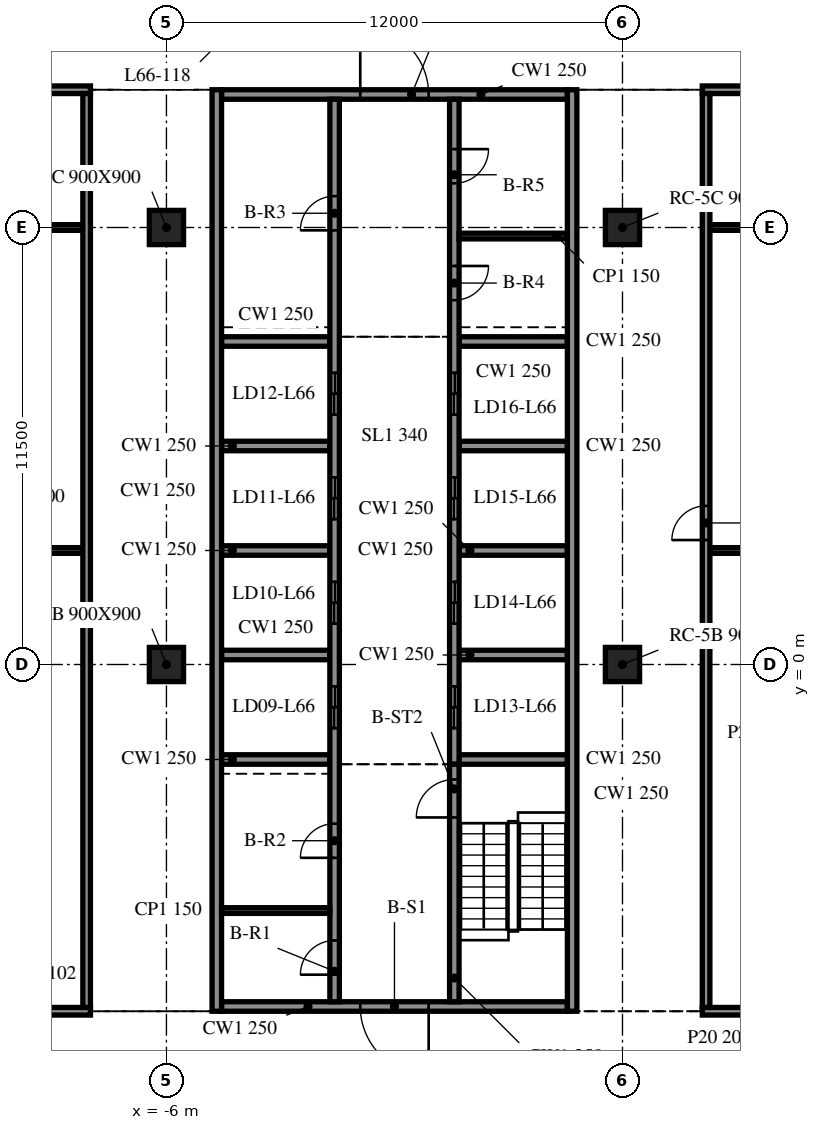
"""IFC4 building model, lengths in metres.
Left out: names, types, materials, properties, quantities, classifications, styles, units other than length and angle.
Written with IfcOpenShell. Run it as: python <this file> out.ifc"""

import sys

from ifc_helpers import new_model, si_unit, direction, frame, frame_2d, origin, origin_2d, place, context, subcontext, project, spatial, rectangle, extrude, element, fill, save


model = new_model("IFC4")
c1 = context("Model", 3, precision=1e-05, world=origin(), true_north=direction((0.0, 1.0)))
c2 = subcontext(c1, "Body", "Model", "MODEL_VIEW")
j1 = project(units=[si_unit("LENGTHUNIT", "METRE"), si_unit("PLANEANGLEUNIT", "RADIAN")], contexts=[c1])
p1 = place(None, origin())
s1 = spatial("IfcSite", under=j1, at=p1, CompositionType="ELEMENT")
p2 = place(p1, origin())
s2 = spatial("IfcBuilding", under=s1, at=p2, CompositionType="ELEMENT")
p3 = place(p2, frame((0.0, 0.0, 270.9)))
s3 = spatial("IfcBuildingStorey", under=s2, at=p3, CompositionType="ELEMENT", Elevation=270.9)
for number, where, z_axis, x_axis in (
    (1, (-6.0, 0.0, -0.34), (0.0, 0.0, 1.0), (1.0, 0.0, 0.0)),
    (2, (-6.0, 11.5, -0.34), (0.0, 0.0, 1.0), (1.0, 0.0, 0.0)),
    (3, (6.0, 0.0, -0.34), (0.0, 0.0, 1.0), (1.0, 0.0, 0.0)),
    (4, (6.0, 11.5, -0.34), (0.0, 0.0, 1.0), (1.0, 0.0, 0.0)),
):
    element("IfcColumn", number, at=place(p3, frame(where, z_axis=z_axis, x_axis=x_axis)), inside=s3, PredefinedType="COLUMN", context=c2, shape_type="SweptSolid", body=[
        extrude(rectangle(XDim=0.9, YDim=0.9, at=origin_2d()), origin(), (0.0, 0.0, 1.0), 3.8),
    ])
for number, where, z_axis, x_axis in (
    (5, (-4.675, 15.125, 0.0), (0.0, 0.0, 1.0), (0.0, -1.0, 0.0)),
    (6, (4.675, -9.125, 0.0), (0.0, 0.0, 1.0), (0.0, 1.0, 0.0)),
):
    element("IfcWall", number, at=place(p3, frame(where, z_axis=z_axis, x_axis=x_axis)), inside=s3, PredefinedType="SOLIDWALL", context=c2, shape_type="SweptSolid", body=[
        extrude(rectangle(XDim=24.25, YDim=0.25, at=frame_2d((12.125, 0.0))), origin(), (0.0, 0.0, 1.0), 3.46),
    ])
p4 = place(p3, frame((4.55, -9.0, 0.0), z_axis=(0.0, 0.0, 1.0), x_axis=(-1.0, 0.0, 0.0)))
e7 = element("IfcWall", 7, at=p4, inside=s3, PredefinedType="SOLIDWALL", context=c2, shape_type="SweptSolid", body=[
    extrude(rectangle(XDim=9.1, YDim=0.25, at=frame_2d((4.55, 0.0))), origin(), (0.0, 0.0, 1.0), 3.46),
])
p5 = place(p4, frame((3.65, 0.0, 0.0)))
e8 = element("IfcOpeningElement", 8, at=p5, cuts=e7, PredefinedType="OPENING", context=c2, shape_type="SweptSolid", body=[
    extrude(rectangle(XDim=1.8, YDim=2.1, at=frame_2d((0.9, 1.05))), frame((0.0, 0.135, 0.0), z_axis=(0.0, -1.0, 0.0), x_axis=(1.0, 0.0, 0.0)), (0.0, 0.0, 1.0), 0.27),
])
p6 = place(p3, frame((-4.55, 15.0, 0.0), z_axis=(0.0, 0.0, 1.0), x_axis=(1.0, 0.0, 0.0)))
e9 = element("IfcWall", 9, at=p6, inside=s3, PredefinedType="SOLIDWALL", context=c2, shape_type="SweptSolid", body=[
    extrude(rectangle(XDim=9.1, YDim=0.25, at=frame_2d((4.55, 0.0))), origin(), (0.0, 0.0, 1.0), 3.46),
])
p7 = place(p6, frame((3.65, 0.0, 0.0)))
e10 = element("IfcOpeningElement", 10, at=p7, cuts=e9, PredefinedType="OPENING", context=c2, shape_type="SweptSolid", body=[
    extrude(rectangle(XDim=1.8, YDim=2.1, at=frame_2d((0.9, 1.05))), frame((0.0, 0.135, 0.0), z_axis=(0.0, -1.0, 0.0), x_axis=(1.0, 0.0, 0.0)), (0.0, 0.0, 1.0), 0.27),
])
p8 = place(p3, frame((-1.575, -8.875, 0.0), z_axis=(0.0, 0.0, 1.0), x_axis=(0.0, 1.0, 0.0)))
e11 = element("IfcWall", 11, at=p8, inside=s3, PredefinedType="SOLIDWALL", context=c2, shape_type="SweptSolid", body=[
    extrude(rectangle(XDim=23.75, YDim=0.25, at=frame_2d((11.875, 0.0))), origin(), (0.0, 0.0, 1.0), 3.46),
])
p9 = place(p8, frame((7.2, 0.0, 0.0)))
e12 = element("IfcOpeningElement", 12, at=p9, cuts=e11, PredefinedType="OPENING", context=c2, shape_type="SweptSolid", body=[
    extrude(rectangle(XDim=1.1, YDim=2.1, at=frame_2d((0.55, 1.05))), frame((0.0, 0.135, 0.0), z_axis=(0.0, -1.0, 0.0), x_axis=(1.0, 0.0, 0.0)), (0.0, 0.0, 1.0), 0.27),
])
p10 = place(p8, frame((9.95, 0.0, 0.0)))
e13 = element("IfcOpeningElement", 13, at=p10, cuts=e11, PredefinedType="OPENING", context=c2, shape_type="SweptSolid", body=[
    extrude(rectangle(XDim=1.1, YDim=2.1, at=frame_2d((0.55, 1.05))), frame((0.0, 0.135, 0.0), z_axis=(0.0, -1.0, 0.0), x_axis=(1.0, 0.0, 0.0)), (0.0, 0.0, 1.0), 0.27),
])
p11 = place(p8, frame((12.7, 0.0, 0.0)))
e14 = element("IfcOpeningElement", 14, at=p11, cuts=e11, PredefinedType="OPENING", context=c2, shape_type="SweptSolid", body=[
    extrude(rectangle(XDim=1.1, YDim=2.1, at=frame_2d((0.55, 1.05))), frame((0.0, 0.135, 0.0), z_axis=(0.0, -1.0, 0.0), x_axis=(1.0, 0.0, 0.0)), (0.0, 0.0, 1.0), 0.27),
])
p12 = place(p8, frame((15.45, 0.0, 0.0)))
e15 = element("IfcOpeningElement", 15, at=p12, cuts=e11, PredefinedType="OPENING", context=c2, shape_type="SweptSolid", body=[
    extrude(rectangle(XDim=1.1, YDim=2.1, at=frame_2d((0.55, 1.05))), frame((0.0, 0.135, 0.0), z_axis=(0.0, -1.0, 0.0), x_axis=(1.0, 0.0, 0.0)), (0.0, 0.0, 1.0), 0.27),
])
p13 = place(p8, frame((0.712, 0.0, 0.0)))
e16 = element("IfcOpeningElement", 16, at=p13, cuts=e11, PredefinedType="OPENING", context=c2, shape_type="SweptSolid", body=[
    extrude(rectangle(XDim=0.9, YDim=2.1, at=frame_2d((0.45, 1.05))), frame((0.0, 0.135, 0.0), z_axis=(0.0, -1.0, 0.0), x_axis=(1.0, 0.0, 0.0)), (0.0, 0.0, 1.0), 0.27),
])
p14 = place(p8, frame((3.788, 0.0, 0.0)))
e17 = element("IfcOpeningElement", 17, at=p14, cuts=e11, PredefinedType="OPENING", context=c2, shape_type="SweptSolid", body=[
    extrude(rectangle(XDim=0.9, YDim=2.1, at=frame_2d((0.45, 1.05))), frame((0.0, 0.135, 0.0), z_axis=(0.0, -1.0, 0.0), x_axis=(1.0, 0.0, 0.0)), (0.0, 0.0, 1.0), 0.27),
])
p15 = place(p8, frame((20.3, 0.0, 0.0)))
e18 = element("IfcOpeningElement", 18, at=p15, cuts=e11, PredefinedType="OPENING", context=c2, shape_type="SweptSolid", body=[
    extrude(rectangle(XDim=0.9, YDim=2.1, at=frame_2d((0.45, 1.05))), frame((0.0, 0.135, 0.0), z_axis=(0.0, -1.0, 0.0), x_axis=(1.0, 0.0, 0.0)), (0.0, 0.0, 1.0), 0.27),
])
p16 = place(p3, frame((1.575, -8.875, 0.0), z_axis=(0.0, 0.0, 1.0), x_axis=(0.0, 1.0, 0.0)))
e19 = element("IfcWall", 19, at=p16, inside=s3, PredefinedType="SOLIDWALL", context=c2, shape_type="SweptSolid", body=[
    extrude(rectangle(XDim=6.25, YDim=0.25, at=frame_2d((3.125, 0.0))), origin(), (0.0, 0.0, 1.0), 3.46),
])
p17 = place(p16, frame((4.85, 0.0, 0.0)))
e20 = element("IfcOpeningElement", 20, at=p17, cuts=e19, PredefinedType="OPENING", context=c2, shape_type="SweptSolid", body=[
    extrude(rectangle(XDim=1.0, YDim=2.1, at=frame_2d((0.5, 1.05))), frame((0.0, 0.135, 0.0), z_axis=(0.0, -1.0, 0.0), x_axis=(1.0, 0.0, 0.0)), (0.0, 0.0, 1.0), 0.27),
])
p18 = place(p3, frame((1.575, 14.875, 0.0), z_axis=(0.0, 0.0, 1.0), x_axis=(0.0, -1.0, 0.0)))
e21 = element("IfcWall", 21, at=p18, inside=s3, PredefinedType="SOLIDWALL", context=c2, shape_type="SweptSolid", body=[
    extrude(rectangle(XDim=17.5, YDim=0.25, at=frame_2d((8.75, 0.0))), origin(), (0.0, 0.0, 1.0), 3.46),
])
p19 = place(p18, frame((15.45, 0.0, 0.0)))
e22 = element("IfcOpeningElement", 22, at=p19, cuts=e21, PredefinedType="OPENING", context=c2, shape_type="SweptSolid", body=[
    extrude(rectangle(XDim=1.1, YDim=2.1, at=frame_2d((0.55, 1.05))), frame((0.0, 0.135, 0.0), z_axis=(0.0, -1.0, 0.0), x_axis=(1.0, 0.0, 0.0)), (0.0, 0.0, 1.0), 0.27),
])
p20 = place(p18, frame((12.7, 0.0, 0.0)))
e23 = element("IfcOpeningElement", 23, at=p20, cuts=e21, PredefinedType="OPENING", context=c2, shape_type="SweptSolid", body=[
    extrude(rectangle(XDim=1.1, YDim=2.1, at=frame_2d((0.55, 1.05))), frame((0.0, 0.135, 0.0), z_axis=(0.0, -1.0, 0.0), x_axis=(1.0, 0.0, 0.0)), (0.0, 0.0, 1.0), 0.27),
])
p21 = place(p18, frame((9.95, 0.0, 0.0)))
e24 = element("IfcOpeningElement", 24, at=p21, cuts=e21, PredefinedType="OPENING", context=c2, shape_type="SweptSolid", body=[
    extrude(rectangle(XDim=1.1, YDim=2.1, at=frame_2d((0.55, 1.05))), frame((0.0, 0.135, 0.0), z_axis=(0.0, -1.0, 0.0), x_axis=(1.0, 0.0, 0.0)), (0.0, 0.0, 1.0), 0.27),
])
p22 = place(p18, frame((7.2, 0.0, 0.0)))
e25 = element("IfcOpeningElement", 25, at=p22, cuts=e21, PredefinedType="OPENING", context=c2, shape_type="SweptSolid", body=[
    extrude(rectangle(XDim=1.1, YDim=2.1, at=frame_2d((0.55, 1.05))), frame((0.0, 0.135, 0.0), z_axis=(0.0, -1.0, 0.0), x_axis=(1.0, 0.0, 0.0)), (0.0, 0.0, 1.0), 0.27),
])
p23 = place(p18, frame((4.387, 0.0, 0.0)))
e26 = element("IfcOpeningElement", 26, at=p23, cuts=e21, PredefinedType="OPENING", context=c2, shape_type="SweptSolid", body=[
    extrude(rectangle(XDim=0.9, YDim=2.1, at=frame_2d((0.45, 1.05))), frame((0.0, 0.135, 0.0), z_axis=(0.0, -1.0, 0.0), x_axis=(1.0, 0.0, 0.0)), (0.0, 0.0, 1.0), 0.27),
])
p24 = place(p18, frame((1.312, 0.0, 0.0)))
e27 = element("IfcOpeningElement", 27, at=p24, cuts=e21, PredefinedType="OPENING", context=c2, shape_type="SweptSolid", body=[
    extrude(rectangle(XDim=0.9, YDim=2.1, at=frame_2d((0.45, 1.05))), frame((0.0, 0.135, 0.0), z_axis=(0.0, -1.0, 0.0), x_axis=(1.0, 0.0, 0.0)), (0.0, 0.0, 1.0), 0.27),
])
for number, where, z_axis, x_axis in (
    (28, (-4.55, -2.5, 0.0), (0.0, 0.0, 1.0), (1.0, 0.0, 0.0)),
    (29, (-4.55, 0.25, 0.0), (0.0, 0.0, 1.0), (1.0, 0.0, 0.0)),
    (30, (-4.55, 3.0, 0.0), (0.0, 0.0, 1.0), (1.0, 0.0, 0.0)),
    (31, (-4.55, 5.75, 0.0), (0.0, 0.0, 1.0), (1.0, 0.0, 0.0)),
    (32, (-4.55, 8.5, 0.0), (0.0, 0.0, 1.0), (1.0, 0.0, 0.0)),
    (33, (1.7, -2.5, 0.0), (0.0, 0.0, 1.0), (1.0, 0.0, 0.0)),
    (34, (1.7, 0.25, 0.0), (0.0, 0.0, 1.0), (1.0, 0.0, 0.0)),
    (35, (1.7, 3.0, 0.0), (0.0, 0.0, 1.0), (1.0, 0.0, 0.0)),
    (36, (1.7, 5.75, 0.0), (0.0, 0.0, 1.0), (1.0, 0.0, 0.0)),
    (37, (1.7, 8.5, 0.0), (0.0, 0.0, 1.0), (1.0, 0.0, 0.0)),
):
    element("IfcWall", number, at=place(p3, frame(where, z_axis=z_axis, x_axis=x_axis)), inside=s3, PredefinedType="SOLIDWALL", context=c2, shape_type="SweptSolid", body=[
        extrude(rectangle(XDim=2.85, YDim=0.25, at=frame_2d((1.425, 0.0))), origin(), (0.0, 0.0, 1.0), 3.46),
    ])
for number, where, z_axis, x_axis in (
    (38, (-4.55, -6.475, 0.0), (0.0, 0.0, 1.0), (1.0, 0.0, 0.0)),
    (39, (1.7, 11.275, 0.0), (0.0, 0.0, 1.0), (1.0, 0.0, 0.0)),
):
    element("IfcWall", number, at=place(p3, frame(where, z_axis=z_axis, x_axis=x_axis)), inside=s3, PredefinedType="PARTITIONING", context=c2, shape_type="SweptSolid", body=[
        extrude(rectangle(XDim=2.85, YDim=0.15, at=frame_2d((1.425, 0.0))), origin(), (0.0, 0.0, 1.0), 3.46),
    ])
p25 = place(p3, frame((-16.1, -9.125, 0.0), z_axis=(0.0, 0.0, 1.0), x_axis=(1.0, 0.0, 0.0)))
e40 = element("IfcWall", 40, at=p25, inside=s3, PredefinedType="PARTITIONING", context=c2, shape_type="SweptSolid", body=[
    extrude(rectangle(XDim=8.1, YDim=0.2, at=frame_2d((4.05, 0.0))), origin(), (0.0, 0.0, 1.0), 3.46),
])
p26 = place(p25, frame((3.5, 0.0, 0.0)))
e41 = element("IfcOpeningElement", 41, at=p26, cuts=e40, PredefinedType="OPENING", context=c2, shape_type="SweptSolid", body=[
    extrude(rectangle(XDim=1.0, YDim=2.1, at=frame_2d((0.5, 1.05))), frame((0.0, 0.11, 0.0), z_axis=(0.0, -1.0, 0.0), x_axis=(1.0, 0.0, 0.0)), (0.0, 0.0, 1.0), 0.22),
])
p27 = place(p3, frame((8.1, -9.125, 0.0), z_axis=(0.0, 0.0, 1.0), x_axis=(1.0, 0.0, 0.0)))
e42 = element("IfcWall", 42, at=p27, inside=s3, PredefinedType="PARTITIONING", context=c2, shape_type="SweptSolid", body=[
    extrude(rectangle(XDim=7.7, YDim=0.2, at=frame_2d((3.85, 0.0))), origin(), (0.0, 0.0, 1.0), 3.46),
])
p28 = place(p27, frame((3.3, 0.0, 0.0)))
e43 = element("IfcOpeningElement", 43, at=p28, cuts=e42, PredefinedType="OPENING", context=c2, shape_type="SweptSolid", body=[
    extrude(rectangle(XDim=1.0, YDim=2.1, at=frame_2d((0.5, 1.05))), frame((0.0, 0.11, 0.0), z_axis=(0.0, -1.0, 0.0), x_axis=(1.0, 0.0, 0.0)), (0.0, 0.0, 1.0), 0.22),
])
p29 = place(p3, frame((-15.9, 3.0, 0.0), z_axis=(0.0, 0.0, 1.0), x_axis=(1.0, 0.0, 0.0)))
e44 = element("IfcWall", 44, at=p29, inside=s3, PredefinedType="PARTITIONING", context=c2, shape_type="SweptSolid", body=[
    extrude(rectangle(XDim=7.7, YDim=0.15, at=frame_2d((3.85, 0.0))), origin(), (0.0, 0.0, 1.0), 3.46),
])
p30 = place(p3, frame((8.3, 3.0, 0.0), z_axis=(0.0, 0.0, 1.0), x_axis=(1.0, 0.0, 0.0)))
e45 = element("IfcWall", 45, at=p30, inside=s3, PredefinedType="PARTITIONING", context=c2, shape_type="SweptSolid", body=[
    extrude(rectangle(XDim=7.3, YDim=0.15, at=frame_2d((3.65, 0.0))), origin(), (0.0, 0.0, 1.0), 3.46),
])
p31 = place(p3, frame((-15.9, 11.5, 0.0), z_axis=(0.0, 0.0, 1.0), x_axis=(1.0, 0.0, 0.0)))
e46 = element("IfcWall", 46, at=p31, inside=s3, PredefinedType="PARTITIONING", context=c2, shape_type="SweptSolid", body=[
    extrude(rectangle(XDim=7.7, YDim=0.15, at=frame_2d((3.85, 0.0))), origin(), (0.0, 0.0, 1.0), 3.46),
])
p32 = place(p3, frame((8.3, 11.5, 0.0), z_axis=(0.0, 0.0, 1.0), x_axis=(1.0, 0.0, 0.0)))
e47 = element("IfcWall", 47, at=p32, inside=s3, PredefinedType="PARTITIONING", context=c2, shape_type="SweptSolid", body=[
    extrude(rectangle(XDim=7.3, YDim=0.15, at=frame_2d((3.65, 0.0))), origin(), (0.0, 0.0, 1.0), 3.46),
])
p33 = place(p3, frame((-16.1, 15.125, 0.0), z_axis=(0.0, 0.0, 1.0), x_axis=(1.0, 0.0, 0.0)))
e48 = element("IfcWall", 48, at=p33, inside=s3, PredefinedType="PARTITIONING", context=c2, shape_type="SweptSolid", body=[
    extrude(rectangle(XDim=8.1, YDim=0.2, at=frame_2d((4.05, 0.0))), origin(), (0.0, 0.0, 1.0), 3.46),
])
p34 = place(p33, frame((3.5, 0.0, 0.0)))
e49 = element("IfcOpeningElement", 49, at=p34, cuts=e48, PredefinedType="OPENING", context=c2, shape_type="SweptSolid", body=[
    extrude(rectangle(XDim=1.0, YDim=2.1, at=frame_2d((0.5, 1.05))), frame((0.0, 0.11, 0.0), z_axis=(0.0, -1.0, 0.0), x_axis=(1.0, 0.0, 0.0)), (0.0, 0.0, 1.0), 0.22),
])
p35 = place(p3, frame((8.1, 15.125, 0.0), z_axis=(0.0, 0.0, 1.0), x_axis=(1.0, 0.0, 0.0)))
e50 = element("IfcWall", 50, at=p35, inside=s3, PredefinedType="PARTITIONING", context=c2, shape_type="SweptSolid", body=[
    extrude(rectangle(XDim=7.7, YDim=0.2, at=frame_2d((3.85, 0.0))), origin(), (0.0, 0.0, 1.0), 3.46),
])
p36 = place(p35, frame((3.3, 0.0, 0.0)))
e51 = element("IfcOpeningElement", 51, at=p36, cuts=e50, PredefinedType="OPENING", context=c2, shape_type="SweptSolid", body=[
    extrude(rectangle(XDim=1.0, YDim=2.1, at=frame_2d((0.5, 1.05))), frame((0.0, 0.11, 0.0), z_axis=(0.0, -1.0, 0.0), x_axis=(1.0, 0.0, 0.0)), (0.0, 0.0, 1.0), 0.22),
])
p37 = place(p3, frame((-8.1, -9.025, 0.0), z_axis=(0.0, 0.0, 1.0), x_axis=(0.0, 1.0, 0.0)))
e52 = element("IfcWall", 52, at=p37, inside=s3, PredefinedType="PARTITIONING", context=c2, shape_type="SweptSolid", body=[
    extrude(rectangle(XDim=24.05, YDim=0.2, at=frame_2d((12.025, 0.0))), origin(), (0.0, 0.0, 1.0), 3.46),
])
p38 = place(p3, frame((8.2, -9.025, 0.0), z_axis=(0.0, 0.0, 1.0), x_axis=(0.0, 1.0, 0.0)))
e53 = element("IfcWall", 53, at=p38, inside=s3, PredefinedType="PARTITIONING", context=c2, shape_type="SweptSolid", body=[
    extrude(rectangle(XDim=24.05, YDim=0.2, at=frame_2d((12.025, 0.0))), origin(), (0.0, 0.0, 1.0), 3.46),
])
p39 = place(p38, frame((12.3, 0.0, 0.0)))
e54 = element("IfcOpeningElement", 54, at=p39, cuts=e53, PredefinedType="OPENING", context=c2, shape_type="SweptSolid", body=[
    extrude(rectangle(XDim=0.9, YDim=2.1, at=frame_2d((0.45, 1.05))), frame((0.0, 0.11, 0.0), z_axis=(0.0, -1.0, 0.0), x_axis=(1.0, 0.0, 0.0)), (0.0, 0.0, 1.0), 0.22),
])
p40 = place(p5, origin())
e55 = element("IfcDoor", 55, at=p40, inside=s3, OperationType="DOUBLE_DOOR_SINGLE_SWING", PredefinedType="DOOR", context=c2, shape_type="SweptSolid", body=[
    extrude(rectangle(XDim=1.8, YDim=2.1, at=frame_2d((0.9, 1.05))), frame((0.0, 0.025, 0.0), z_axis=(0.0, -1.0, 0.0), x_axis=(1.0, 0.0, 0.0)), (0.0, 0.0, 1.0), 0.05),
])
fill(e8, e55)
p41 = place(p7, origin())
e56 = element("IfcDoor", 56, at=p41, inside=s3, OperationType="DOUBLE_DOOR_SINGLE_SWING", PredefinedType="DOOR", context=c2, shape_type="SweptSolid", body=[
    extrude(rectangle(XDim=1.8, YDim=2.1, at=frame_2d((0.9, 1.05))), frame((0.0, 0.025, 0.0), z_axis=(0.0, -1.0, 0.0), x_axis=(1.0, 0.0, 0.0)), (0.0, 0.0, 1.0), 0.05),
])
fill(e10, e56)
p42 = place(p19, origin())
e57 = element("IfcDoor", 57, at=p42, inside=s3, OperationType="DOUBLE_DOOR_SLIDING", PredefinedType="DOOR", context=c2, shape_type="SweptSolid", body=[
    extrude(rectangle(XDim=1.1, YDim=2.1, at=frame_2d((0.55, 1.05))), frame((0.0, 0.025, 0.0), z_axis=(0.0, -1.0, 0.0), x_axis=(1.0, 0.0, 0.0)), (0.0, 0.0, 1.0), 0.05),
])
fill(e22, e57)
p43 = place(p20, origin())
e58 = element("IfcDoor", 58, at=p43, inside=s3, OperationType="DOUBLE_DOOR_SLIDING", PredefinedType="DOOR", context=c2, shape_type="SweptSolid", body=[
    extrude(rectangle(XDim=1.1, YDim=2.1, at=frame_2d((0.55, 1.05))), frame((0.0, 0.025, 0.0), z_axis=(0.0, -1.0, 0.0), x_axis=(1.0, 0.0, 0.0)), (0.0, 0.0, 1.0), 0.05),
])
fill(e23, e58)
p44 = place(p21, origin())
e59 = element("IfcDoor", 59, at=p44, inside=s3, OperationType="DOUBLE_DOOR_SLIDING", PredefinedType="DOOR", context=c2, shape_type="SweptSolid", body=[
    extrude(rectangle(XDim=1.1, YDim=2.1, at=frame_2d((0.55, 1.05))), frame((0.0, 0.025, 0.0), z_axis=(0.0, -1.0, 0.0), x_axis=(1.0, 0.0, 0.0)), (0.0, 0.0, 1.0), 0.05),
])
fill(e24, e59)
p45 = place(p22, origin())
e60 = element("IfcDoor", 60, at=p45, inside=s3, OperationType="DOUBLE_DOOR_SLIDING", PredefinedType="DOOR", context=c2, shape_type="SweptSolid", body=[
    extrude(rectangle(XDim=1.1, YDim=2.1, at=frame_2d((0.55, 1.05))), frame((0.0, 0.025, 0.0), z_axis=(0.0, -1.0, 0.0), x_axis=(1.0, 0.0, 0.0)), (0.0, 0.0, 1.0), 0.05),
])
fill(e25, e60)
p46 = place(p9, origin())
e61 = element("IfcDoor", 61, at=p46, inside=s3, OperationType="DOUBLE_DOOR_SLIDING", PredefinedType="DOOR", context=c2, shape_type="SweptSolid", body=[
    extrude(rectangle(XDim=1.1, YDim=2.1, at=frame_2d((0.55, 1.05))), frame((0.0, 0.025, 0.0), z_axis=(0.0, -1.0, 0.0), x_axis=(1.0, 0.0, 0.0)), (0.0, 0.0, 1.0), 0.05),
])
fill(e12, e61)
p47 = place(p10, origin())
e62 = element("IfcDoor", 62, at=p47, inside=s3, OperationType="DOUBLE_DOOR_SLIDING", PredefinedType="DOOR", context=c2, shape_type="SweptSolid", body=[
    extrude(rectangle(XDim=1.1, YDim=2.1, at=frame_2d((0.55, 1.05))), frame((0.0, 0.025, 0.0), z_axis=(0.0, -1.0, 0.0), x_axis=(1.0, 0.0, 0.0)), (0.0, 0.0, 1.0), 0.05),
])
fill(e13, e62)
p48 = place(p11, origin())
e63 = element("IfcDoor", 63, at=p48, inside=s3, OperationType="DOUBLE_DOOR_SLIDING", PredefinedType="DOOR", context=c2, shape_type="SweptSolid", body=[
    extrude(rectangle(XDim=1.1, YDim=2.1, at=frame_2d((0.55, 1.05))), frame((0.0, 0.025, 0.0), z_axis=(0.0, -1.0, 0.0), x_axis=(1.0, 0.0, 0.0)), (0.0, 0.0, 1.0), 0.05),
])
fill(e14, e63)
p49 = place(p12, origin())
e64 = element("IfcDoor", 64, at=p49, inside=s3, OperationType="DOUBLE_DOOR_SLIDING", PredefinedType="DOOR", context=c2, shape_type="SweptSolid", body=[
    extrude(rectangle(XDim=1.1, YDim=2.1, at=frame_2d((0.55, 1.05))), frame((0.0, 0.025, 0.0), z_axis=(0.0, -1.0, 0.0), x_axis=(1.0, 0.0, 0.0)), (0.0, 0.0, 1.0), 0.05),
])
fill(e15, e64)
p50 = place(p13, origin())
e65 = element("IfcDoor", 65, at=p50, inside=s3, OperationType="SINGLE_SWING_LEFT", PredefinedType="DOOR", context=c2, shape_type="SweptSolid", body=[
    extrude(rectangle(XDim=0.9, YDim=2.1, at=frame_2d((0.45, 1.05))), frame((0.0, 0.025, 0.0), z_axis=(0.0, -1.0, 0.0), x_axis=(1.0, 0.0, 0.0)), (0.0, 0.0, 1.0), 0.05),
])
fill(e16, e65)
p51 = place(p14, origin())
e66 = element("IfcDoor", 66, at=p51, inside=s3, OperationType="SINGLE_SWING_RIGHT", PredefinedType="DOOR", context=c2, shape_type="SweptSolid", body=[
    extrude(rectangle(XDim=0.9, YDim=2.1, at=frame_2d((0.45, 1.05))), frame((0.0, 0.025, 0.0), z_axis=(0.0, -1.0, 0.0), x_axis=(1.0, 0.0, 0.0)), (0.0, 0.0, 1.0), 0.05),
])
fill(e17, e66)
p52 = place(p15, origin())
e67 = element("IfcDoor", 67, at=p52, inside=s3, OperationType="SINGLE_SWING_LEFT", PredefinedType="DOOR", context=c2, shape_type="SweptSolid", body=[
    extrude(rectangle(XDim=0.9, YDim=2.1, at=frame_2d((0.45, 1.05))), frame((0.0, 0.025, 0.0), z_axis=(0.0, -1.0, 0.0), x_axis=(1.0, 0.0, 0.0)), (0.0, 0.0, 1.0), 0.05),
])
fill(e18, e67)
p53 = place(p23, origin())
e68 = element("IfcDoor", 68, at=p53, inside=s3, OperationType="SINGLE_SWING_RIGHT", PredefinedType="DOOR", context=c2, shape_type="SweptSolid", body=[
    extrude(rectangle(XDim=0.9, YDim=2.1, at=frame_2d((0.45, 1.05))), frame((0.0, 0.025, 0.0), z_axis=(0.0, -1.0, 0.0), x_axis=(1.0, 0.0, 0.0)), (0.0, 0.0, 1.0), 0.05),
])
fill(e26, e68)
p54 = place(p24, origin())
e69 = element("IfcDoor", 69, at=p54, inside=s3, OperationType="SINGLE_SWING_LEFT", PredefinedType="DOOR", context=c2, shape_type="SweptSolid", body=[
    extrude(rectangle(XDim=0.9, YDim=2.1, at=frame_2d((0.45, 1.05))), frame((0.0, 0.025, 0.0), z_axis=(0.0, -1.0, 0.0), x_axis=(1.0, 0.0, 0.0)), (0.0, 0.0, 1.0), 0.05),
])
fill(e27, e69)
p55 = place(p17, origin())
e70 = element("IfcDoor", 70, at=p55, inside=s3, OperationType="SINGLE_SWING_RIGHT", PredefinedType="DOOR", context=c2, shape_type="SweptSolid", body=[
    extrude(rectangle(XDim=1.0, YDim=2.1, at=frame_2d((0.5, 1.05))), frame((0.0, 0.025, 0.0), z_axis=(0.0, -1.0, 0.0), x_axis=(1.0, 0.0, 0.0)), (0.0, 0.0, 1.0), 0.05),
])
fill(e20, e70)
p56 = place(p39, origin())
e71 = element("IfcDoor", 71, at=p56, inside=s3, OperationType="SINGLE_SWING_LEFT", PredefinedType="DOOR", context=c2, shape_type="SweptSolid", body=[
    extrude(rectangle(XDim=0.9, YDim=2.1, at=frame_2d((0.45, 1.05))), frame((0.0, 0.025, 0.0), z_axis=(0.0, -1.0, 0.0), x_axis=(1.0, 0.0, 0.0)), (0.0, 0.0, 1.0), 0.05),
])
fill(e54, e71)
save(model, sys.argv[1])
